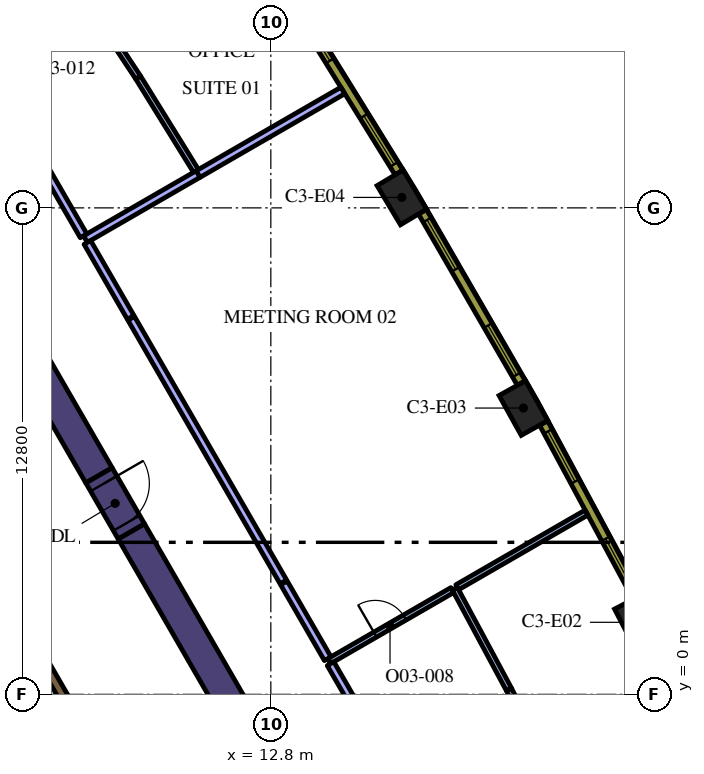
"""IFC4 building model, lengths in metres.
Left out: names, types, materials, properties, quantities, classifications, styles, units other than length and angle.
Written with IfcOpenShell. Run it as: python <this file> out.ifc"""

import sys

from ifc_helpers import new_model, si_unit, direction, frame, frame_2d, origin, origin_2d, place, context, subcontext, project, spatial, rectangle, extrude, element, fill, save


model = new_model("IFC4")
c1 = context("Model", 3, precision=1e-05, world=origin(), true_north=direction((0.0, 1.0)))
c2 = subcontext(c1, "Body", "Model", "MODEL_VIEW")
j1 = project(units=[si_unit("LENGTHUNIT", "METRE"), si_unit("PLANEANGLEUNIT", "RADIAN")], contexts=[c1])
p1 = place(None, origin())
s1 = spatial("IfcSite", under=j1, at=p1, CompositionType="ELEMENT")
p2 = place(p1, origin())
s2 = spatial("IfcBuilding", under=s1, at=p2, CompositionType="ELEMENT")
p3 = place(p2, frame((0.0, 0.0, 171.0)))
s3 = spatial("IfcBuildingStorey", under=s2, at=p3, CompositionType="ELEMENT", Elevation=171.0)
for number, where, z_axis, x_axis in (
    (1, (22.476, 1.896, 0.0), (0.0, 0.0, 1.0), (-0.46, 0.888, 0.0)),
    (2, (19.447, 7.533, 0.0), (0.0, 0.0, 1.0), (-0.487, 0.874, 0.0)),
    (3, (16.247, 13.075, 0.0), (0.0, 0.0, 1.0), (-0.513, 0.858, 0.0)),
):
    element("IfcColumn", number, at=place(p3, frame(where, z_axis=z_axis, x_axis=x_axis)), inside=s3, PredefinedType="COLUMN", context=c2, shape_type="SweptSolid", body=[
        extrude(rectangle(XDim=1.2, YDim=0.8, at=origin_2d()), origin(), (0.0, 0.0, 1.0), 4.2),
    ])
p4 = place(p3, frame((9.129, 4.289, 0.0), z_axis=(0.0, 0.0, 1.0), x_axis=(0.499995742806, -0.866027861663, 0.0)))
e4 = element("IfcWall", 4, at=p4, inside=s3, PredefinedType="SOLIDWALL", context=c2, shape_type="SweptSolid", body=[
    extrude(rectangle(XDim=12.527, YDim=0.8, at=frame_2d((6.264, 0.0))), origin(), (0.0, 0.0, 1.0), 4.2),
])
p5 = place(p3, frame((8.279, 5.761, 0.0), z_axis=(0.0, 0.0, 1.0), x_axis=(-0.500010359015, 0.866019422922, 0.0)))
e5 = element("IfcWall", 5, at=p5, inside=s3, PredefinedType="SOLIDWALL", context=c2, shape_type="SweptSolid", body=[
    extrude(rectangle(XDim=12.528, YDim=0.8, at=frame_2d((6.264, 0.0))), origin(), (0.0, 0.0, 1.0), 4.2),
])
p6 = place(p3, frame((8.565, -2.185, 0.0), z_axis=(0.0, 0.0, 1.0), x_axis=(-0.499997954832, 0.866026584559, 0.0)))
e6 = element("IfcWall", 6, at=p6, inside=s3, PredefinedType="SOLIDWALL", context=c2, shape_type="SweptSolid", body=[
    extrude(rectangle(XDim=12.35, YDim=0.25, at=frame_2d((6.175, 0.0))), origin(), (0.0, 0.0, 1.0), 4.2),
])
p7 = place(p6, frame((0.585, 0.0, 0.0)))
e7 = element("IfcOpeningElement", 7, at=p7, cuts=e6, PredefinedType="OPENING", context=c2, shape_type="SweptSolid", body=[
    extrude(rectangle(XDim=1.1, YDim=2.1, at=frame_2d((0.55, 1.05))), frame((0.0, 0.135, 0.0), z_axis=(0.0, -1.0, 0.0), x_axis=(1.0, 0.0, 0.0)), (0.0, 0.0, 1.0), 0.27),
])
p8 = place(p3, frame((8.279, 5.761, 0.0), z_axis=(0.0, 0.0, 1.0), x_axis=(0.500062241894, -0.865989465428, 0.0)))
e8 = element("IfcWall", 8, at=p8, inside=s3, PredefinedType="SOLIDWALL", context=c2, shape_type="SweptSolid", body=[
    extrude(rectangle(XDim=1.7, YDim=0.8, at=frame_2d((0.85, 0.0))), origin(), (0.0, 0.0, 1.0), 4.2),
])
p9 = place(p8, frame((0.25, 0.0, 0.0)))
e9 = element("IfcOpeningElement", 9, at=p9, cuts=e8, PredefinedType="OPENING", context=c2, shape_type="SweptSolid", body=[
    extrude(rectangle(XDim=1.2, YDim=2.1, at=frame_2d((0.6, 1.05))), frame((0.0, 0.41, 0.0), z_axis=(0.0, -1.0, 0.0), x_axis=(1.0, 0.0, 0.0)), (0.0, 0.0, 1.0), 0.82),
])
p10 = place(p3, frame((19.066, 0.129, 0.0), z_axis=(0.0, 0.0, 1.0), x_axis=(0.446215695511, -0.894925445543, 0.0)))
e10 = element("IfcWall", 10, at=p10, inside=s3, PredefinedType="PARTITIONING", context=c2, shape_type="SweptSolid", body=[
    extrude(rectangle(XDim=3.328, YDim=0.15, at=frame_2d((1.664, 0.0))), origin(), (0.0, 0.0, 1.0), 3.15),
])
p11 = place(p10, frame((1.228, 0.0, 0.0)))
e11 = element("IfcOpeningElement", 11, at=p11, cuts=e10, PredefinedType="OPENING", context=c2, shape_type="SweptSolid", body=[
    extrude(rectangle(XDim=0.9, YDim=2.1, at=frame_2d((0.45, 1.05))), frame((0.0, 0.085, 0.0), z_axis=(0.0, -1.0, 0.0), x_axis=(1.0, 0.0, 0.0)), (0.0, 0.0, 1.0), 0.17),
])
p12 = place(p3, frame((19.066, 0.129, 0.0), z_axis=(0.0, 0.0, 1.0), x_axis=(-0.473359743891, 0.88086920304, 0.0)))
e12 = element("IfcWall", 12, at=p12, inside=s3, PredefinedType="PARTITIONING", context=c2, shape_type="SweptSolid", body=[
    extrude(rectangle(XDim=3.01, YDim=0.15, at=frame_2d((1.505, 0.0))), origin(), (0.0, 0.0, 1.0), 3.15),
])
p13 = place(p3, frame((17.706, 2.819, 0.0), z_axis=(0.0, 0.0, 1.0), x_axis=(0.866023031919, 0.500004108169, 0.0)))
e13 = element("IfcWall", 13, at=p13, inside=s3, PredefinedType="PARTITIONING", context=c2, shape_type="SweptSolid", body=[
    extrude(rectangle(XDim=3.927, YDim=0.15, at=frame_2d((1.963, 0.0))), origin(), (0.0, 0.0, 1.0), 3.15),
])
p14 = place(p3, frame((14.334, 0.872, 0.0), z_axis=(0.0, 0.0, 1.0), x_axis=(0.866027010039, 0.499997217876, 0.0)))
e14 = element("IfcWall", 14, at=p14, inside=s3, PredefinedType="PARTITIONING", context=c2, shape_type="SweptSolid", body=[
    extrude(rectangle(XDim=3.743, YDim=0.15, at=frame_2d((1.872, 0.0))), origin(), (0.0, 0.0, 1.0), 3.15),
])
p15 = place(p14, frame((1.4, 0.0, 0.0)))
e15 = element("IfcOpeningElement", 15, at=p15, cuts=e14, PredefinedType="OPENING", context=c2, shape_type="SweptSolid", body=[
    extrude(rectangle(XDim=0.9, YDim=2.1, at=frame_2d((0.45, 1.05))), frame((0.0, 0.085, 0.0), z_axis=(0.0, -1.0, 0.0), x_axis=(1.0, 0.0, 0.0)), (0.0, 0.0, 1.0), 0.17),
])
p16 = place(p3, frame((18.489, -6.324, 0.0), z_axis=(0.0, 0.0, 1.0), x_axis=(-0.500003913404, 0.866023144368, 0.0)))
e16 = element("IfcWall", 16, at=p16, inside=s3, PredefinedType="PARTITIONING", context=c2, shape_type="SweptSolid", body=[
    extrude(rectangle(XDim=8.234, YDim=0.2, at=frame_2d((4.117, 0.0))), origin(), (0.0, 0.0, 1.0), 3.15),
])
p17 = place(p3, frame((10.879, 13.685, 0.0), z_axis=(0.0, 0.0, 1.0), x_axis=(0.866035177799, 0.499983070528, 0.0)))
e17 = element("IfcWall", 17, at=p17, inside=s3, PredefinedType="PARTITIONING", context=c2, shape_type="SweptSolid", body=[
    extrude(rectangle(XDim=4.406, YDim=0.2, at=frame_2d((2.203, 0.0))), origin(), (0.0, 0.0, 1.0), 3.15),
])
p18 = place(p3, frame((7.922, 11.978, 0.0), z_axis=(0.0, 0.0, 1.0), x_axis=(0.866008564848, 0.50002916476, 0.0)))
e18 = element("IfcWall", 18, at=p18, inside=s3, PredefinedType="PARTITIONING", context=c2, shape_type="SweptSolid", body=[
    extrude(rectangle(XDim=3.422, YDim=0.2, at=frame_2d((1.711, 0.0))), origin(), (0.0, 0.0, 1.0), 3.15),
])
p19 = place(p3, frame((13.13, 2.958, 0.0), z_axis=(0.0, 0.0, 1.0), x_axis=(-0.499995158272, 0.866028199139, 0.0)))
e19 = element("IfcWall", 19, at=p19, inside=s3, PredefinedType="PARTITIONING", context=c2, shape_type="SweptSolid", body=[
    extrude(rectangle(XDim=8.008, YDim=0.2, at=frame_2d((4.004, 0.0))), origin(), (0.0, 0.0, 1.0), 3.15),
])
p20 = place(p3, frame((9.111, 9.918, 0.0), z_axis=(0.0, 0.0, 1.0), x_axis=(-0.499954382462, 0.86605173948, 0.0)))
e20 = element("IfcWall", 20, at=p20, inside=s3, PredefinedType="PARTITIONING", context=c2, shape_type="SweptSolid", body=[
    extrude(rectangle(XDim=2.278, YDim=0.2, at=frame_2d((1.139, 0.0))), origin(), (0.0, 0.0, 1.0), 3.15),
])
p21 = place(p3, frame((14.297, 0.937, 0.0), z_axis=(0.0, 0.0, 1.0), x_axis=(-0.499970234539, 0.866042588199, 0.0)))
e21 = element("IfcWall", 21, at=p21, inside=s3, PredefinedType="PARTITIONING", context=c2, shape_type="SweptSolid", body=[
    extrude(rectangle(XDim=2.303, YDim=0.2, at=frame_2d((1.151, 0.0))), origin(), (0.0, 0.0, 1.0), 3.15),
])
p22 = place(p3, frame((10.83, 13.772, 0.0), z_axis=(0.0, 0.0, 1.0), x_axis=(-0.526229630206, 0.850342505284, 0.0)))
e22 = element("IfcWall", 22, at=p22, inside=s3, PredefinedType="PARTITIONING", context=c2, shape_type="SweptSolid", body=[
    extrude(rectangle(XDim=2.892, YDim=0.15, at=frame_2d((1.446, 0.0))), origin(), (0.0, 0.0, 1.0), 3.15),
])
p23 = place(p3, frame((7.461, 19.022, 0.0), z_axis=(0.0, 0.0, 1.0), x_axis=(0.551902709159, -0.833908507945, 0.0)))
e23 = element("IfcWall", 23, at=p23, inside=s3, PredefinedType="PARTITIONING", context=c2, shape_type="SweptSolid", body=[
    extrude(rectangle(XDim=3.347, YDim=0.15, at=frame_2d((1.673, 0.0))), origin(), (0.0, 0.0, 1.0), 3.15),
])
p24 = place(p23, frame((1.247, 0.0, 0.0)))
e24 = element("IfcOpeningElement", 24, at=p24, cuts=e23, PredefinedType="OPENING", context=c2, shape_type="SweptSolid", body=[
    extrude(rectangle(XDim=0.9, YDim=2.1, at=frame_2d((0.45, 1.05))), frame((0.0, 0.085, 0.0), z_axis=(0.0, -1.0, 0.0), x_axis=(1.0, 0.0, 0.0)), (0.0, 0.0, 1.0), 0.17),
])
p25 = place(p3, frame((7.872, 12.064, 0.0), z_axis=(0.0, 0.0, 1.0), x_axis=(-0.499995192696, 0.866028179265, 0.0)))
e25 = element("IfcWall", 25, at=p25, inside=s3, PredefinedType="PARTITIONING", context=c2, shape_type="SweptSolid", body=[
    extrude(rectangle(XDim=8.239, YDim=0.2, at=frame_2d((4.12, 0.0))), origin(), (0.0, 0.0, 1.0), 3.15),
])
p26 = place(p25, frame((3.6, 0.0, 0.0)))
e26 = element("IfcOpeningElement", 26, at=p26, cuts=e25, PredefinedType="OPENING", context=c2, shape_type="SweptSolid", body=[
    extrude(rectangle(XDim=1.0, YDim=2.1, at=frame_2d((0.5, 1.05))), frame((0.0, 0.11, 0.0), z_axis=(0.0, -1.0, 0.0), x_axis=(1.0, 0.0, 0.0)), (0.0, 0.0, 1.0), 0.22),
])
p27 = place(p3, frame((22.44, 2.555, 0.0), z_axis=(0.0, 0.0, 1.0), x_axis=(-0.473349833294, 0.880874528704, 0.0)))
e27 = element("IfcWall", 27, at=p27, inside=s3, PredefinedType="SOLIDWALL", context=c2, shape_type="SweptSolid", body=[
    extrude(rectangle(XDim=5.204, YDim=0.24, at=frame_2d((2.602, 0.0))), origin(), (0.0, 0.0, 1.0), 3.95),
])
p28 = place(p27, frame((0.248, 0.0, 0.9)))
e28 = element("IfcOpeningElement", 28, at=p28, cuts=e27, PredefinedType="OPENING", context=c2, shape_type="SweptSolid", body=[
    extrude(rectangle(XDim=1.5, YDim=2.55, at=frame_2d((0.75, 1.275))), frame((0.0, 0.13, 0.0), z_axis=(0.0, -1.0, 0.0), x_axis=(1.0, 0.0, 0.0)), (0.0, 0.0, 1.0), 0.26),
])
p29 = place(p27, frame((3.455, 0.0, 0.9)))
e29 = element("IfcOpeningElement", 29, at=p29, cuts=e27, PredefinedType="OPENING", context=c2, shape_type="SweptSolid", body=[
    extrude(rectangle(XDim=1.5, YDim=2.55, at=frame_2d((0.75, 1.275))), frame((0.0, 0.13, 0.0), z_axis=(0.0, -1.0, 0.0), x_axis=(1.0, 0.0, 0.0)), (0.0, 0.0, 1.0), 0.26),
])
p30 = place(p3, frame((19.391, 8.191, 0.0), z_axis=(0.0, 0.0, 1.0), x_axis=(-0.500009456303, 0.866019944116, 0.0)))
e30 = element("IfcWall", 30, at=p30, inside=s3, PredefinedType="SOLIDWALL", context=c2, shape_type="SweptSolid", body=[
    extrude(rectangle(XDim=5.204, YDim=0.24, at=frame_2d((2.602, 0.0))), origin(), (0.0, 0.0, 1.0), 3.95),
])
p31 = place(p30, frame((0.248, 0.0, 0.9)))
e31 = element("IfcOpeningElement", 31, at=p31, cuts=e30, PredefinedType="OPENING", context=c2, shape_type="SweptSolid", body=[
    extrude(rectangle(XDim=1.5, YDim=2.55, at=frame_2d((0.75, 1.275))), frame((0.0, 0.13, 0.0), z_axis=(0.0, -1.0, 0.0), x_axis=(1.0, 0.0, 0.0)), (0.0, 0.0, 1.0), 0.26),
])
p32 = place(p30, frame((3.455, 0.0, 0.9)))
e32 = element("IfcOpeningElement", 32, at=p32, cuts=e30, PredefinedType="OPENING", context=c2, shape_type="SweptSolid", body=[
    extrude(rectangle(XDim=1.5, YDim=2.55, at=frame_2d((0.75, 1.275))), frame((0.0, 0.13, 0.0), z_axis=(0.0, -1.0, 0.0), x_axis=(1.0, 0.0, 0.0)), (0.0, 0.0, 1.0), 0.26),
])
p33 = place(p3, frame((16.171, 13.731, 0.0), z_axis=(0.0, 0.0, 1.0), x_axis=(-0.526197926587, 0.850362124072, 0.0)))
e33 = element("IfcWall", 33, at=p33, inside=s3, PredefinedType="SOLIDWALL", context=c2, shape_type="SweptSolid", body=[
    extrude(rectangle(XDim=5.203, YDim=0.24, at=frame_2d((2.602, 0.0))), origin(), (0.0, 0.0, 1.0), 3.95),
])
p34 = place(p33, frame((0.248, 0.0, 0.9)))
e34 = element("IfcOpeningElement", 34, at=p34, cuts=e33, PredefinedType="OPENING", context=c2, shape_type="SweptSolid", body=[
    extrude(rectangle(XDim=1.5, YDim=2.55, at=frame_2d((0.75, 1.275))), frame((0.0, 0.13, 0.0), z_axis=(0.0, -1.0, 0.0), x_axis=(1.0, 0.0, 0.0)), (0.0, 0.0, 1.0), 0.26),
])
p35 = place(p33, frame((3.455, 0.0, 0.9)))
e35 = element("IfcOpeningElement", 35, at=p35, cuts=e33, PredefinedType="OPENING", context=c2, shape_type="SweptSolid", body=[
    extrude(rectangle(XDim=1.5, YDim=2.55, at=frame_2d((0.75, 1.275))), frame((0.0, 0.13, 0.0), z_axis=(0.0, -1.0, 0.0), x_axis=(1.0, 0.0, 0.0)), (0.0, 0.0, 1.0), 0.26),
])
p36 = place(p9, origin())
e36 = element("IfcDoor", 36, at=p36, inside=s3, OperationType="SINGLE_SWING_LEFT", PredefinedType="DOOR", context=c2, shape_type="SweptSolid", body=[
    extrude(rectangle(XDim=1.2, YDim=2.1, at=frame_2d((0.6, 1.05))), frame((0.0, 0.025, 0.0), z_axis=(0.0, -1.0, 0.0), x_axis=(1.0, 0.0, 0.0)), (0.0, 0.0, 1.0), 0.05),
])
fill(e9, e36)
p37 = place(p15, origin())
e37 = element("IfcDoor", 37, at=p37, inside=s3, OperationType="SINGLE_SWING_LEFT", PredefinedType="DOOR", context=c2, shape_type="SweptSolid", body=[
    extrude(rectangle(XDim=0.9, YDim=2.1, at=frame_2d((0.45, 1.05))), frame((0.0, 0.025, 0.0), z_axis=(0.0, -1.0, 0.0), x_axis=(1.0, 0.0, 0.0)), (0.0, 0.0, 1.0), 0.05),
])
fill(e15, e37)
p38 = place(p28, origin())
e38 = element("IfcWindow", 38, at=p38, inside=s3, PartitioningType="SINGLE_PANEL", PredefinedType="WINDOW", context=c2, shape_type="SweptSolid", body=[
    extrude(rectangle(XDim=1.5, YDim=2.55, at=frame_2d((0.75, 1.275))), frame((0.0, 0.04, 0.0), z_axis=(0.0, -1.0, 0.0), x_axis=(1.0, 0.0, 0.0)), (0.0, 0.0, 1.0), 0.06),
])
fill(e28, e38)
p39 = place(p29, origin())
e39 = element("IfcWindow", 39, at=p39, inside=s3, PartitioningType="SINGLE_PANEL", PredefinedType="WINDOW", context=c2, shape_type="SweptSolid", body=[
    extrude(rectangle(XDim=1.5, YDim=2.55, at=frame_2d((0.75, 1.275))), frame((0.0, 0.04, 0.0), z_axis=(0.0, -1.0, 0.0), x_axis=(1.0, 0.0, 0.0)), (0.0, 0.0, 1.0), 0.06),
])
fill(e29, e39)
p40 = place(p31, origin())
e40 = element("IfcWindow", 40, at=p40, inside=s3, PartitioningType="SINGLE_PANEL", PredefinedType="WINDOW", context=c2, shape_type="SweptSolid", body=[
    extrude(rectangle(XDim=1.5, YDim=2.55, at=frame_2d((0.75, 1.275))), frame((0.0, 0.04, 0.0), z_axis=(0.0, -1.0, 0.0), x_axis=(1.0, 0.0, 0.0)), (0.0, 0.0, 1.0), 0.06),
])
fill(e31, e40)
p41 = place(p32, origin())
e41 = element("IfcWindow", 41, at=p41, inside=s3, PartitioningType="SINGLE_PANEL", PredefinedType="WINDOW", context=c2, shape_type="SweptSolid", body=[
    extrude(rectangle(XDim=1.5, YDim=2.55, at=frame_2d((0.75, 1.275))), frame((0.0, 0.04, 0.0), z_axis=(0.0, -1.0, 0.0), x_axis=(1.0, 0.0, 0.0)), (0.0, 0.0, 1.0), 0.06),
])
fill(e32, e41)
p42 = place(p34, origin())
e42 = element("IfcWindow", 42, at=p42, inside=s3, PartitioningType="SINGLE_PANEL", PredefinedType="WINDOW", context=c2, shape_type="SweptSolid", body=[
    extrude(rectangle(XDim=1.5, YDim=2.55, at=frame_2d((0.75, 1.275))), frame((0.0, 0.04, 0.0), z_axis=(0.0, -1.0, 0.0), x_axis=(1.0, 0.0, 0.0)), (0.0, 0.0, 1.0), 0.06),
])
fill(e34, e42)
p43 = place(p35, origin())
e43 = element("IfcWindow", 43, at=p43, inside=s3, PartitioningType="SINGLE_PANEL", PredefinedType="WINDOW", context=c2, shape_type="SweptSolid", body=[
    extrude(rectangle(XDim=1.5, YDim=2.55, at=frame_2d((0.75, 1.275))), frame((0.0, 0.04, 0.0), z_axis=(0.0, -1.0, 0.0), x_axis=(1.0, 0.0, 0.0)), (0.0, 0.0, 1.0), 0.06),
])
fill(e35, e43)
save(model, sys.argv[1])
